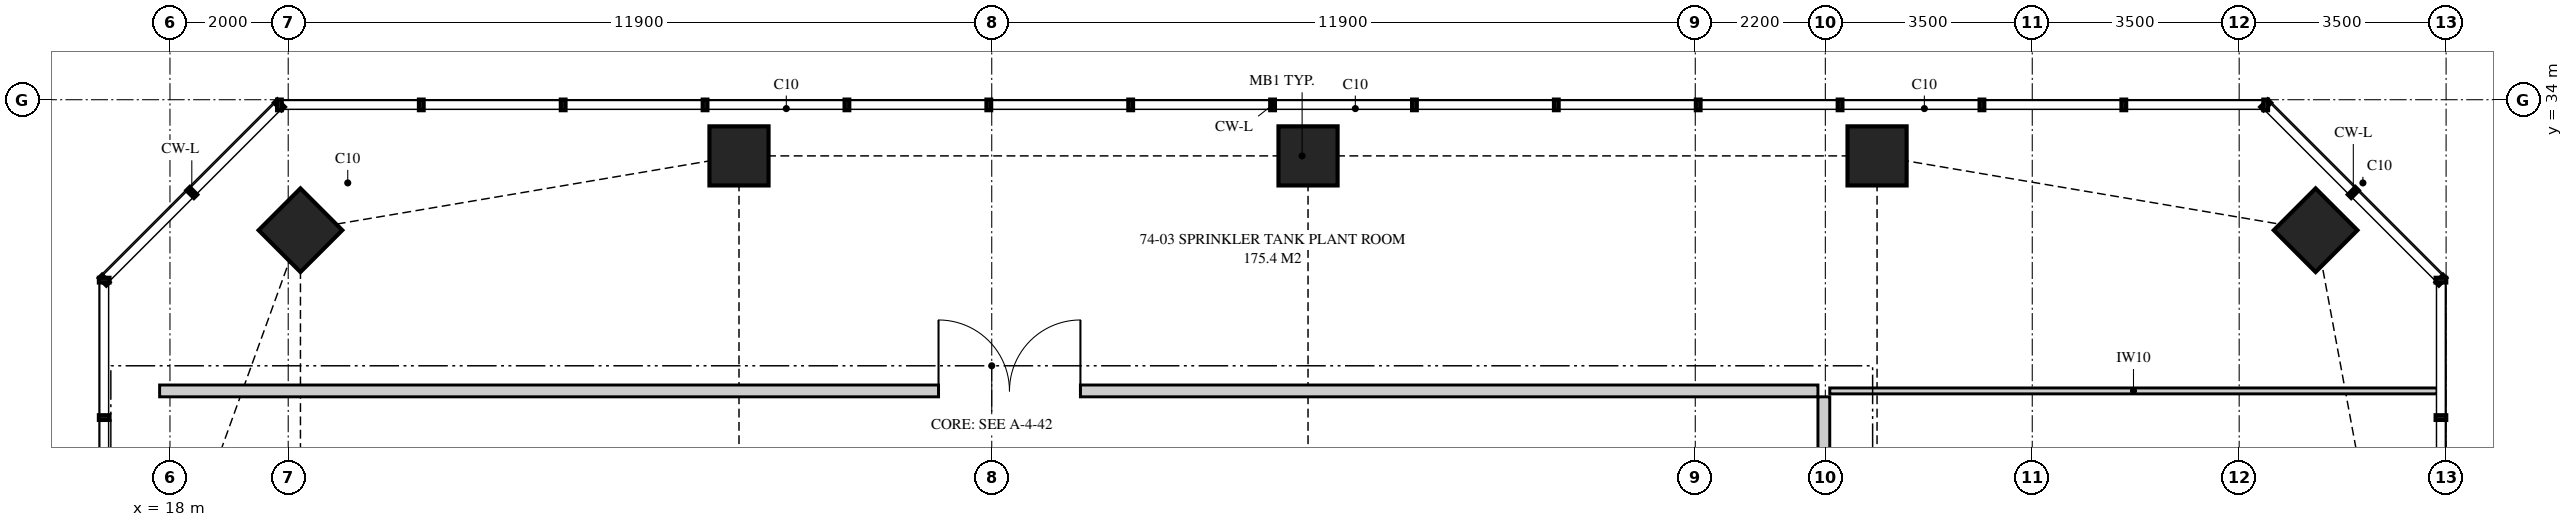
"""IFC4 building model, lengths in metres.
Left out: names, types, materials, properties, quantities, classifications, styles, units other than length and angle.
Written with IfcOpenShell. Run it as: python <this file> out.ifc"""

import sys

from ifc_helpers import new_model, si_unit, direction, frame, frame_2d, origin, origin_2d, place, context, subcontext, project, spatial, polyline, rectangle, outline, extrude, element, fill, save


model = new_model("IFC4")
c1 = context("Model", 3, precision=1e-05, world=origin(), true_north=direction((0.0, 1.0)))
c2 = subcontext(c1, "Body", "Model", "MODEL_VIEW")
j1 = project(units=[si_unit("LENGTHUNIT", "METRE"), si_unit("PLANEANGLEUNIT", "RADIAN")], contexts=[c1])
p1 = place(None, origin())
s1 = spatial("IfcSite", under=j1, at=p1, CompositionType="ELEMENT")
p2 = place(p1, origin())
s2 = spatial("IfcBuilding", under=s1, at=p2, CompositionType="ELEMENT")
p3 = place(p2, frame((0.0, 0.0, 272.75)))
s3 = spatial("IfcBuildingStorey", under=s2, at=p3, CompositionType="ELEMENT", Elevation=272.75)
for number, where, z_axis, x_axis in (
    (1, (54.293, 31.793, 0.0), (0.0, 0.0, 1.0), (0.707, 0.707, 0.0)),
    (2, (46.875, 33.05, 0.0), (0.0, 0.0, 1.0), (1.0, 0.0, 0.0)),
    (3, (37.25, 33.05, 0.0), (0.0, 0.0, 1.0), (1.0, 0.0, 0.0)),
    (4, (27.625, 33.05, 0.0), (0.0, 0.0, 1.0), (1.0, 0.0, 0.0)),
    (5, (20.207, 31.793, 0.0), (0.0, 0.0, 1.0), (0.707, 0.707, 0.0)),
):
    element("IfcColumn", number, at=place(p3, frame(where, z_axis=z_axis, x_axis=x_axis)), inside=s3, PredefinedType="COLUMN", context=c2, shape_type="SweptSolid", body=[
        extrude(rectangle(XDim=1.0, YDim=1.0, at=origin_2d()), origin(), (0.0, 0.0, 1.0), 5.0),
    ])
p4 = place(p3, frame((17.825, 29.075, 0.0), z_axis=(0.0, 0.0, 1.0), x_axis=(1.0, 0.0, 0.0)))
e6 = element("IfcWall", 6, at=p4, inside=s3, PredefinedType="PARTITIONING", context=c2, shape_type="SweptSolid", body=[
    extrude(outline(polyline([(0.0, 0.0), (28.05, 0.0), (28.05, 4.72), (28.05, 4.12), (27.74, 4.12), (27.74, 4.72), (20.735, 4.72), (20.735, 4.12), (18.115, 4.12), (18.115, 4.72), (11.11, 4.72), (11.11, 4.12), (8.49, 4.12), (8.49, 4.72), (3.692, 4.72), (3.692, 4.12), (2.367, 4.12), (2.367, 3.5), (0.431, 3.5), (0.431, 4.72), (0.0, 4.72), (0.0, 0.0)])), frame((0.0, 0.1, 0.0), z_axis=(0.0, -1.0, 0.0), x_axis=(1.0, 0.0, 0.0)), (0.0, 0.0, 1.0), 0.2),
])
p5 = place(p4, frame((13.175, 0.0, 0.0)))
e7 = element("IfcOpeningElement", 7, at=p5, cuts=e6, PredefinedType="OPENING", context=c2, shape_type="SweptSolid", body=[
    extrude(rectangle(XDim=2.4, YDim=2.4, at=frame_2d((1.2, 1.2))), frame((0.0, 0.11, 0.0), z_axis=(0.0, -1.0, 0.0), x_axis=(1.0, 0.0, 0.0)), (0.0, 0.0, 1.0), 0.22),
])
p6 = place(p3, frame((45.975, 27.175, 0.0), z_axis=(0.0, 0.0, 1.0), x_axis=(0.0, 1.0, 0.0)))
e8 = element("IfcWall", 8, at=p6, inside=s3, PredefinedType="PARTITIONING", context=c2, shape_type="SweptSolid", body=[
    extrude(outline(polyline([(0.0, 0.0), (1.8, 0.0), (1.8, 4.72), (1.8, 4.12), (0.0, 4.12), (0.0, 4.72), (0.0, 0.0)])), frame((0.0, 0.1, 0.0), z_axis=(0.0, -1.0, 0.0), x_axis=(1.0, 0.0, 0.0)), (0.0, 0.0, 1.0), 0.2),
])
p7 = place(p3, frame((46.075, 29.075, 0.0), z_axis=(0.0, 0.0, 1.0), x_axis=(1.0, 0.0, 0.0)))
e9 = element("IfcWall", 9, at=p7, inside=s3, PredefinedType="PARTITIONING", context=c2, shape_type="SweptSolid", body=[
    extrude(outline(polyline([(0.0, 0.0), (10.275, 0.0), (10.275, 4.72), (9.595, 4.72), (9.595, 3.5), (7.846, 3.5), (7.846, 4.72), (2.06, 4.72), (2.06, 4.12), (0.0, 4.12), (0.0, 4.72), (0.0, 0.0)])), frame((0.0, 0.05, 0.0), z_axis=(0.0, -1.0, 0.0), x_axis=(1.0, 0.0, 0.0)), (0.0, 0.0, 1.0), 0.1),
])
p8 = place(p5, origin())
e10 = element("IfcDoor", 10, at=p8, inside=s3, OperationType="DOUBLE_DOOR_SINGLE_SWING", PredefinedType="DOOR", context=c2, shape_type="SweptSolid", body=[
    extrude(rectangle(XDim=2.4, YDim=2.4, at=frame_2d((1.2, 1.2))), frame((0.0, 0.025, 0.0), z_axis=(0.0, -1.0, 0.0), x_axis=(1.0, 0.0, 0.0)), (0.0, 0.0, 1.0), 0.05),
])
fill(e7, e10)
save(model, sys.argv[1])
